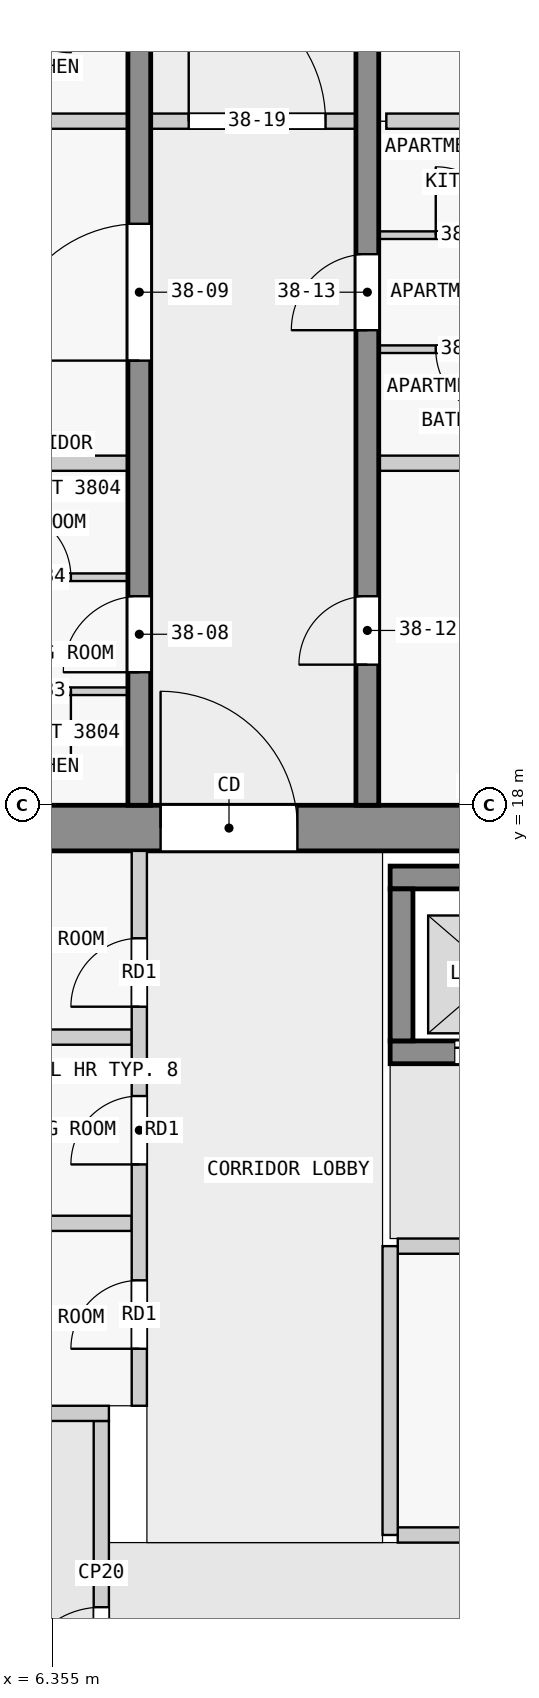
"""IFC4 building model, lengths in metres.
Left out: names, types, materials, properties, quantities, classifications, styles, units other than length and angle.
Written with IfcOpenShell. Run it as: python <this file> out.ifc"""

import sys

from ifc_helpers import new_model, si_unit, direction, frame, frame_2d, origin, place, context, subcontext, project, spatial, rectangle, extrude, element, fill, save


model = new_model("IFC4")
c1 = context("Model", 3, precision=1e-05, world=origin(), true_north=direction((0.0, 1.0)))
c2 = subcontext(c1, "Body", "Model", "MODEL_VIEW")
j1 = project(units=[si_unit("LENGTHUNIT", "METRE"), si_unit("PLANEANGLEUNIT", "RADIAN")], contexts=[c1])
p1 = place(None, origin())
s1 = spatial("IfcSite", under=j1, at=p1, CompositionType="ELEMENT")
p2 = place(p1, origin())
s2 = spatial("IfcBuilding", under=s1, at=p2, CompositionType="ELEMENT")
p3 = place(p2, frame((0.0, 0.0, 149.9)))
s3 = spatial("IfcBuildingStorey", under=s2, at=p3, CompositionType="ELEMENT", Elevation=149.9)
p4 = place(p3, frame((1.38, 17.7, 0.0), z_axis=(0.0, 0.0, 1.0), x_axis=(1.0, 0.0, 0.0)))
e1 = element("IfcWall", 1, at=p4, inside=s3, PredefinedType="SHEAR", context=c2, shape_type="SweptSolid", body=[
    extrude(rectangle(XDim=21.12, YDim=0.6, at=frame_2d((10.56, 0.0))), origin(), (0.0, 0.0, 1.0), 3.25),
])
p5 = place(p4, frame((6.4, 0.0, 0.0)))
e2 = element("IfcOpeningElement", 2, at=p5, cuts=e1, PredefinedType="OPENING", context=c2, shape_type="SweptSolid", body=[
    extrude(rectangle(XDim=1.8, YDim=2.1, at=frame_2d((0.9, 1.05))), frame((0.0, 0.31, 0.0), z_axis=(0.0, -1.0, 0.0), x_axis=(1.0, 0.0, 0.0)), (0.0, 0.0, 1.0), 0.62),
])
p6 = place(p3, frame((10.8, 17.05, 0.0), z_axis=(0.0, 0.0, 1.0), x_axis=(1.0, 0.0, 0.0)))
e3 = element("IfcWall", 3, at=p6, inside=s3, PredefinedType="SHEAR", context=c2, shape_type="SweptSolid", body=[
    extrude(rectangle(XDim=7.8, YDim=0.3, at=frame_2d((3.9, 0.0))), origin(), (0.0, 0.0, 1.0), 3.25),
])
p7 = place(p3, frame((10.8, 14.75, 0.0), z_axis=(0.0, 0.0, 1.0), x_axis=(1.0, 0.0, 0.0)))
e4 = element("IfcWall", 4, at=p7, inside=s3, PredefinedType="SHEAR", context=c2, shape_type="SweptSolid", body=[
    extrude(rectangle(XDim=7.8, YDim=0.3, at=frame_2d((3.9, 0.0))), origin(), (0.0, 0.0, 1.0), 3.25),
])
p8 = place(p7, frame((0.85, 0.0, 0.0)))
e5 = element("IfcOpeningElement", 5, at=p8, cuts=e4, PredefinedType="OPENING", context=c2, shape_type="SweptSolid", body=[
    extrude(rectangle(XDim=1.1, YDim=2.1, at=frame_2d((0.55, 1.05))), frame((0.0, 0.16, 0.0), z_axis=(0.0, -1.0, 0.0), x_axis=(1.0, 0.0, 0.0)), (0.0, 0.0, 1.0), 0.32),
])
p9 = place(p7, frame((3.35, 0.0, 0.0)))
e6 = element("IfcOpeningElement", 6, at=p9, cuts=e4, PredefinedType="OPENING", context=c2, shape_type="SweptSolid", body=[
    extrude(rectangle(XDim=1.1, YDim=2.1, at=frame_2d((0.55, 1.05))), frame((0.0, 0.16, 0.0), z_axis=(0.0, -1.0, 0.0), x_axis=(1.0, 0.0, 0.0)), (0.0, 0.0, 1.0), 0.32),
])
p10 = place(p7, frame((5.85, 0.0, 0.0)))
e7 = element("IfcOpeningElement", 7, at=p10, cuts=e4, PredefinedType="OPENING", context=c2, shape_type="SweptSolid", body=[
    extrude(rectangle(XDim=1.1, YDim=2.1, at=frame_2d((0.55, 1.05))), frame((0.0, 0.16, 0.0), z_axis=(0.0, -1.0, 0.0), x_axis=(1.0, 0.0, 0.0)), (0.0, 0.0, 1.0), 0.32),
])
p11 = place(p3, frame((10.95, 14.9, 0.0), z_axis=(0.0, 0.0, 1.0), x_axis=(0.0, 1.0, 0.0)))
e8 = element("IfcWall", 8, at=p11, inside=s3, PredefinedType="SHEAR", context=c2, shape_type="SweptSolid", body=[
    extrude(rectangle(XDim=2.0, YDim=0.3, at=frame_2d((1.0, 0.0))), origin(), (0.0, 0.0, 1.0), 3.25),
])
p12 = place(p3, frame((7.5, 18.0, 0.0), z_axis=(0.0, 0.0, 1.0), x_axis=(0.0, 1.0, 0.0)))
e9 = element("IfcWall", 9, at=p12, inside=s3, PredefinedType="SHEAR", context=c2, shape_type="SweptSolid", body=[
    extrude(rectangle(XDim=27.0, YDim=0.3, at=frame_2d((13.5, 0.0))), origin(), (0.0, 0.0, 1.0), 3.25),
])
p13 = place(p12, frame((1.75, 0.0, 0.0)))
e10 = element("IfcOpeningElement", 10, at=p13, cuts=e9, PredefinedType="OPENING", context=c2, shape_type="SweptSolid", body=[
    extrude(rectangle(XDim=1.0, YDim=2.1, at=frame_2d((0.5, 1.05))), frame((0.0, 0.16, 0.0), z_axis=(0.0, -1.0, 0.0), x_axis=(1.0, 0.0, 0.0)), (0.0, 0.0, 1.0), 0.32),
])
p14 = place(p12, frame((5.85, 0.0, 0.0)))
e11 = element("IfcOpeningElement", 11, at=p14, cuts=e9, PredefinedType="OPENING", context=c2, shape_type="SweptSolid", body=[
    extrude(rectangle(XDim=1.8, YDim=2.1, at=frame_2d((0.9, 1.05))), frame((0.0, 0.16, 0.0), z_axis=(0.0, -1.0, 0.0), x_axis=(1.0, 0.0, 0.0)), (0.0, 0.0, 1.0), 0.32),
])
p15 = place(p12, frame((13.05, 0.0, 0.0)))
e12 = element("IfcOpeningElement", 12, at=p15, cuts=e9, PredefinedType="OPENING", context=c2, shape_type="SweptSolid", body=[
    extrude(rectangle(XDim=1.0, YDim=2.1, at=frame_2d((0.5, 1.05))), frame((0.0, 0.16, 0.0), z_axis=(0.0, -1.0, 0.0), x_axis=(1.0, 0.0, 0.0)), (0.0, 0.0, 1.0), 0.32),
])
p16 = place(p12, frame((21.35, 0.0, 0.0)))
e13 = element("IfcOpeningElement", 13, at=p16, cuts=e9, PredefinedType="OPENING", context=c2, shape_type="SweptSolid", body=[
    extrude(rectangle(XDim=1.0, YDim=2.1, at=frame_2d((0.5, 1.05))), frame((0.0, 0.16, 0.0), z_axis=(0.0, -1.0, 0.0), x_axis=(1.0, 0.0, 0.0)), (0.0, 0.0, 1.0), 0.32),
])
p17 = place(p3, frame((10.5, 18.0, 0.0), z_axis=(0.0, 0.0, 1.0), x_axis=(0.0, 1.0, 0.0)))
e14 = element("IfcWall", 14, at=p17, inside=s3, PredefinedType="SHEAR", context=c2, shape_type="SweptSolid", body=[
    extrude(rectangle(XDim=27.0, YDim=0.3, at=frame_2d((13.5, 0.0))), origin(), (0.0, 0.0, 1.0), 3.25),
])
p18 = place(p17, frame((1.85, 0.0, 0.0)))
e15 = element("IfcOpeningElement", 15, at=p18, cuts=e14, PredefinedType="OPENING", context=c2, shape_type="SweptSolid", body=[
    extrude(rectangle(XDim=0.9, YDim=2.1, at=frame_2d((0.45, 1.05))), frame((0.0, 0.16, 0.0), z_axis=(0.0, -1.0, 0.0), x_axis=(1.0, 0.0, 0.0)), (0.0, 0.0, 1.0), 0.32),
])
p19 = place(p17, frame((6.25, 0.0, 0.0)))
e16 = element("IfcOpeningElement", 16, at=p19, cuts=e14, PredefinedType="OPENING", context=c2, shape_type="SweptSolid", body=[
    extrude(rectangle(XDim=1.0, YDim=2.1, at=frame_2d((0.5, 1.05))), frame((0.0, 0.16, 0.0), z_axis=(0.0, -1.0, 0.0), x_axis=(1.0, 0.0, 0.0)), (0.0, 0.0, 1.0), 0.32),
])
p20 = place(p17, frame((10.85, 0.0, 0.0)))
e17 = element("IfcOpeningElement", 17, at=p20, cuts=e14, PredefinedType="OPENING", context=c2, shape_type="SweptSolid", body=[
    extrude(rectangle(XDim=0.9, YDim=2.1, at=frame_2d((0.45, 1.05))), frame((0.0, 0.16, 0.0), z_axis=(0.0, -1.0, 0.0), x_axis=(1.0, 0.0, 0.0)), (0.0, 0.0, 1.0), 0.32),
])
p21 = place(p17, frame((17.55, 0.0, 0.0)))
e18 = element("IfcOpeningElement", 18, at=p21, cuts=e14, PredefinedType="OPENING", context=c2, shape_type="SweptSolid", body=[
    extrude(rectangle(XDim=1.0, YDim=2.1, at=frame_2d((0.5, 1.05))), frame((0.0, 0.16, 0.0), z_axis=(0.0, -1.0, 0.0), x_axis=(1.0, 0.0, 0.0)), (0.0, 0.0, 1.0), 0.32),
])
p22 = place(p17, frame((23.25, 0.0, 0.0)))
e19 = element("IfcOpeningElement", 19, at=p22, cuts=e14, PredefinedType="OPENING", context=c2, shape_type="SweptSolid", body=[
    extrude(rectangle(XDim=0.9, YDim=2.1, at=frame_2d((0.45, 1.05))), frame((0.0, 0.16, 0.0), z_axis=(0.0, -1.0, 0.0), x_axis=(1.0, 0.0, 0.0)), (0.0, 0.0, 1.0), 0.32),
])
p23 = place(p17, frame((25.45, 0.0, 0.0)))
e20 = element("IfcOpeningElement", 20, at=p23, cuts=e14, PredefinedType="OPENING", context=c2, shape_type="SweptSolid", body=[
    extrude(rectangle(XDim=1.0, YDim=2.1, at=frame_2d((0.5, 1.05))), frame((0.0, 0.16, 0.0), z_axis=(0.0, -1.0, 0.0), x_axis=(1.0, 0.0, 0.0)), (0.0, 0.0, 1.0), 0.32),
])
p24 = place(p3, frame((7.0, 5.9, 0.0), z_axis=(0.0, 0.0, 1.0), x_axis=(0.0, 1.0, 0.0)))
e21 = element("IfcWall", 21, at=p24, inside=s3, PredefinedType="PARTITIONING", context=c2, shape_type="SweptSolid", body=[
    extrude(rectangle(XDim=4.0, YDim=0.2, at=frame_2d((2.0, 0.0))), origin(), (0.0, 0.0, 1.0), 3.25),
])
p25 = place(p24, frame((0.45, 0.0, 0.0)))
e22 = element("IfcOpeningElement", 22, at=p25, cuts=e21, PredefinedType="OPENING", context=c2, shape_type="SweptSolid", body=[
    extrude(rectangle(XDim=1.1, YDim=2.1, at=frame_2d((0.55, 1.05))), frame((0.0, 0.11, 0.0), z_axis=(0.0, -1.0, 0.0), x_axis=(1.0, 0.0, 0.0)), (0.0, 0.0, 1.0), 0.22),
])
p26 = place(p3, frame((5.15, 10.0, 0.0), z_axis=(0.0, 0.0, 1.0), x_axis=(1.0, 0.0, 0.0)))
e23 = element("IfcWall", 23, at=p26, inside=s3, PredefinedType="PARTITIONING", context=c2, shape_type="SweptSolid", body=[
    extrude(rectangle(XDim=1.95, YDim=0.2, at=frame_2d((0.975, 0.0))), origin(), (0.0, 0.0, 1.0), 3.25),
])
p27 = place(p3, frame((10.8, 8.4, 0.0), z_axis=(0.0, 0.0, 1.0), x_axis=(0.0, 1.0, 0.0)))
e24 = element("IfcWall", 24, at=p27, inside=s3, PredefinedType="PARTITIONING", context=c2, shape_type="SweptSolid", body=[
    extrude(rectangle(XDim=3.8, YDim=0.2, at=frame_2d((1.9, 0.0))), origin(), (0.0, 0.0, 1.0), 3.25),
])
p28 = place(p3, frame((10.9, 8.4, 0.0), z_axis=(0.0, 0.0, 1.0), x_axis=(1.0, 0.0, 0.0)))
e25 = element("IfcWall", 25, at=p28, inside=s3, PredefinedType="PARTITIONING", context=c2, shape_type="SweptSolid", body=[
    extrude(rectangle(XDim=6.1, YDim=0.2, at=frame_2d((3.05, 0.0))), origin(), (0.0, 0.0, 1.0), 3.25),
])
p29 = place(p3, frame((10.9, 12.2, 0.0), z_axis=(0.0, 0.0, 1.0), x_axis=(1.0, 0.0, 0.0)))
e26 = element("IfcWall", 26, at=p29, inside=s3, PredefinedType="PARTITIONING", context=c2, shape_type="SweptSolid", body=[
    extrude(rectangle(XDim=6.1, YDim=0.2, at=frame_2d((3.05, 0.0))), origin(), (0.0, 0.0, 1.0), 3.25),
])
p30 = place(p29, frame((2.6, 0.0, 0.0)))
e27 = element("IfcOpeningElement", 27, at=p30, cuts=e26, PredefinedType="OPENING", context=c2, shape_type="SweptSolid", body=[
    extrude(rectangle(XDim=0.9, YDim=2.1, at=frame_2d((0.45, 1.05))), frame((0.0, 0.11, 0.0), z_axis=(0.0, -1.0, 0.0), x_axis=(1.0, 0.0, 0.0)), (0.0, 0.0, 1.0), 0.22),
])
p31 = place(p3, frame((7.5, 10.1, 0.0), z_axis=(0.0, 0.0, 1.0), x_axis=(0.0, 1.0, 0.0)))
e28 = element("IfcWall", 28, at=p31, inside=s3, PredefinedType="PARTITIONING", context=c2, shape_type="SweptSolid", body=[
    extrude(rectangle(XDim=7.3, YDim=0.2, at=frame_2d((3.65, 0.0))), origin(), (0.0, 0.0, 1.0), 3.25),
])
p32 = place(p31, frame((0.75, 0.0, 0.0)))
e29 = element("IfcOpeningElement", 29, at=p32, cuts=e28, PredefinedType="OPENING", context=c2, shape_type="SweptSolid", body=[
    extrude(rectangle(XDim=0.9, YDim=2.1, at=frame_2d((0.45, 1.05))), frame((0.0, 0.11, 0.0), z_axis=(0.0, -1.0, 0.0), x_axis=(1.0, 0.0, 0.0)), (0.0, 0.0, 1.0), 0.22),
])
p33 = place(p31, frame((3.175, 0.0, 0.0)))
e30 = element("IfcOpeningElement", 30, at=p33, cuts=e28, PredefinedType="OPENING", context=c2, shape_type="SweptSolid", body=[
    extrude(rectangle(XDim=0.9, YDim=2.1, at=frame_2d((0.45, 1.05))), frame((0.0, 0.11, 0.0), z_axis=(0.0, -1.0, 0.0), x_axis=(1.0, 0.0, 0.0)), (0.0, 0.0, 1.0), 0.22),
])
p34 = place(p31, frame((5.25, 0.0, 0.0)))
e31 = element("IfcOpeningElement", 31, at=p34, cuts=e28, PredefinedType="OPENING", context=c2, shape_type="SweptSolid", body=[
    extrude(rectangle(XDim=0.9, YDim=2.1, at=frame_2d((0.45, 1.05))), frame((0.0, 0.11, 0.0), z_axis=(0.0, -1.0, 0.0), x_axis=(1.0, 0.0, 0.0)), (0.0, 0.0, 1.0), 0.22),
])
for number, where, z_axis, x_axis in (
    (32, (5.15, 12.5, 0.0), (0.0, 0.0, 1.0), (1.0, 0.0, 0.0)),
    (33, (5.15, 14.95, 0.0), (0.0, 0.0, 1.0), (1.0, 0.0, 0.0)),
):
    element("IfcWall", number, at=place(p3, frame(where, z_axis=z_axis, x_axis=x_axis)), inside=s3, PredefinedType="PARTITIONING", context=c2, shape_type="SweptSolid", body=[
        extrude(rectangle(XDim=2.25, YDim=0.2, at=frame_2d((1.125, 0.0))), origin(), (0.0, 0.0, 1.0), 3.25),
    ])
p35 = place(p3, frame((7.35, 19.5, 0.0), z_axis=(0.0, 0.0, 1.0), x_axis=(-1.0, 0.0, 0.0)))
e34 = element("IfcWall", 34, at=p35, inside=s3, PredefinedType="PARTITIONING", context=c2, shape_type="SweptSolid", body=[
    extrude(rectangle(XDim=2.4, YDim=0.1, at=frame_2d((1.2, 0.0))), origin(), (0.0, 0.0, 1.0), 3.25),
])
p36 = place(p35, frame((0.75, 0.0, 0.0)))
e35 = element("IfcOpeningElement", 35, at=p36, cuts=e34, PredefinedType="OPENING", context=c2, shape_type="SweptSolid", body=[
    extrude(rectangle(XDim=0.9, YDim=2.1, at=frame_2d((0.45, 1.05))), frame((0.0, 0.06, 0.0), z_axis=(0.0, -1.0, 0.0), x_axis=(1.0, 0.0, 0.0)), (0.0, 0.0, 1.0), 0.12),
])
p37 = place(p3, frame((4.95, 21.0, 0.0), z_axis=(0.0, 0.0, 1.0), x_axis=(1.0, 0.0, 0.0)))
e36 = element("IfcWall", 36, at=p37, inside=s3, PredefinedType="PARTITIONING", context=c2, shape_type="SweptSolid", body=[
    extrude(rectangle(XDim=2.4, YDim=0.1, at=frame_2d((1.2, 0.0))), origin(), (0.0, 0.0, 1.0), 3.25),
])
p38 = place(p37, frame((0.75, 0.0, 0.0)))
e37 = element("IfcOpeningElement", 37, at=p38, cuts=e36, PredefinedType="OPENING", context=c2, shape_type="SweptSolid", body=[
    extrude(rectangle(XDim=0.9, YDim=2.1, at=frame_2d((0.45, 1.05))), frame((0.0, 0.06, 0.0), z_axis=(0.0, -1.0, 0.0), x_axis=(1.0, 0.0, 0.0)), (0.0, 0.0, 1.0), 0.12),
])
p39 = place(p3, frame((7.35, 22.5, 0.0), z_axis=(0.0, 0.0, 1.0), x_axis=(-1.0, 0.0, 0.0)))
e38 = element("IfcWall", 38, at=p39, inside=s3, PredefinedType="PARTITIONING", context=c2, shape_type="SweptSolid", body=[
    extrude(rectangle(XDim=2.3, YDim=0.2, at=frame_2d((1.15, 0.0))), origin(), (0.0, 0.0, 1.0), 3.25),
])
p40 = place(p3, frame((17.85, 22.5, 0.0), z_axis=(0.0, 0.0, 1.0), x_axis=(-1.0, 0.0, 0.0)))
e39 = element("IfcWall", 39, at=p40, inside=s3, PredefinedType="PARTITIONING", context=c2, shape_type="SweptSolid", body=[
    extrude(rectangle(XDim=7.2, YDim=0.2, at=frame_2d((3.6, 0.0))), origin(), (0.0, 0.0, 1.0), 3.25),
])
p41 = place(p3, frame((13.05, 24.0, 0.0), z_axis=(0.0, 0.0, 1.0), x_axis=(-1.0, 0.0, 0.0)))
e40 = element("IfcWall", 40, at=p41, inside=s3, PredefinedType="PARTITIONING", context=c2, shape_type="SweptSolid", body=[
    extrude(rectangle(XDim=2.4, YDim=0.1, at=frame_2d((1.2, 0.0))), origin(), (0.0, 0.0, 1.0), 3.25),
])
p42 = place(p41, frame((0.75, 0.0, 0.0)))
e41 = element("IfcOpeningElement", 41, at=p42, cuts=e40, PredefinedType="OPENING", context=c2, shape_type="SweptSolid", body=[
    extrude(rectangle(XDim=0.9, YDim=2.1, at=frame_2d((0.45, 1.05))), frame((0.0, 0.06, 0.0), z_axis=(0.0, -1.0, 0.0), x_axis=(1.0, 0.0, 0.0)), (0.0, 0.0, 1.0), 0.12),
])
p43 = place(p3, frame((10.65, 25.5, 0.0), z_axis=(0.0, 0.0, 1.0), x_axis=(1.0, 0.0, 0.0)))
e42 = element("IfcWall", 42, at=p43, inside=s3, PredefinedType="PARTITIONING", context=c2, shape_type="SweptSolid", body=[
    extrude(rectangle(XDim=2.4, YDim=0.1, at=frame_2d((1.2, 0.0))), origin(), (0.0, 0.0, 1.0), 3.25),
])
p44 = place(p43, frame((0.75, 0.0, 0.0)))
e43 = element("IfcOpeningElement", 43, at=p44, cuts=e42, PredefinedType="OPENING", context=c2, shape_type="SweptSolid", body=[
    extrude(rectangle(XDim=0.9, YDim=2.1, at=frame_2d((0.45, 1.05))), frame((0.0, 0.06, 0.0), z_axis=(0.0, -1.0, 0.0), x_axis=(1.0, 0.0, 0.0)), (0.0, 0.0, 1.0), 0.12),
])
p45 = place(p3, frame((7.35, 27.0, 0.0), z_axis=(0.0, 0.0, 1.0), x_axis=(-1.0, 0.0, 0.0)))
e44 = element("IfcWall", 44, at=p45, inside=s3, PredefinedType="PARTITIONING", context=c2, shape_type="SweptSolid", body=[
    extrude(rectangle(XDim=7.43, YDim=0.2, at=frame_2d((3.715, 0.0))), origin(), (0.0, 0.0, 1.0), 3.25),
])
p46 = place(p3, frame((12.95, 27.0, 0.0), z_axis=(0.0, 0.0, 1.0), x_axis=(-1.0, 0.0, 0.0)))
e45 = element("IfcWall", 45, at=p46, inside=s3, PredefinedType="PARTITIONING", context=c2, shape_type="SweptSolid", body=[
    extrude(rectangle(XDim=2.2, YDim=0.2, at=frame_2d((1.1, 0.0))), origin(), (0.0, 0.0, 1.0), 3.25),
])
p47 = place(p3, frame((7.45, 27.0, 0.0), z_axis=(0.0, 0.0, 1.0), x_axis=(1.0, 0.0, 0.0)))
e46 = element("IfcWall", 46, at=p47, inside=s3, PredefinedType="PARTITIONING", context=c2, shape_type="SweptSolid", body=[
    extrude(rectangle(XDim=3.2, YDim=0.2, at=frame_2d((1.6, 0.0))), origin(), (0.0, 0.0, 1.0), 3.25),
])
p48 = place(p47, frame((0.7, 0.0, 0.0)))
e47 = element("IfcOpeningElement", 47, at=p48, cuts=e46, PredefinedType="OPENING", context=c2, shape_type="SweptSolid", body=[
    extrude(rectangle(XDim=1.8, YDim=2.1, at=frame_2d((0.9, 1.05))), frame((0.0, 0.11, 0.0), z_axis=(0.0, -1.0, 0.0), x_axis=(1.0, 0.0, 0.0)), (0.0, 0.0, 1.0), 0.22),
])
p49 = place(p25, origin())
e48 = element("IfcDoor", 48, at=p49, inside=s3, OperationType="SINGLE_SWING_LEFT", PredefinedType="DOOR", context=c2, shape_type="SweptSolid", body=[
    extrude(rectangle(XDim=1.1, YDim=2.1, at=frame_2d((0.55, 1.05))), frame((0.0, 0.025, 0.0), z_axis=(0.0, -1.0, 0.0), x_axis=(1.0, 0.0, 0.0)), (0.0, 0.0, 1.0), 0.05),
])
fill(e22, e48)
p50 = place(p8, origin())
e49 = element("IfcDoor", 49, at=p50, inside=s3, OperationType="DOUBLE_DOOR_SLIDING", PredefinedType="DOOR", context=c2, shape_type="SweptSolid", body=[
    extrude(rectangle(XDim=1.1, YDim=2.1, at=frame_2d((0.55, 1.05))), frame((0.0, 0.025, 0.0), z_axis=(0.0, -1.0, 0.0), x_axis=(1.0, 0.0, 0.0)), (0.0, 0.0, 1.0), 0.05),
])
fill(e5, e49)
p51 = place(p5, origin())
e50 = element("IfcDoor", 50, at=p51, inside=s3, OperationType="DOUBLE_DOOR_SINGLE_SWING", PredefinedType="DOOR", context=c2, shape_type="SweptSolid", body=[
    extrude(rectangle(XDim=1.8, YDim=2.1, at=frame_2d((0.9, 1.05))), frame((0.0, 0.025, 0.0), z_axis=(0.0, -1.0, 0.0), x_axis=(1.0, 0.0, 0.0)), (0.0, 0.0, 1.0), 0.05),
])
fill(e2, e50)
p52 = place(p32, origin())
e51 = element("IfcDoor", 51, at=p52, inside=s3, OperationType="SINGLE_SWING_RIGHT", PredefinedType="DOOR", context=c2, shape_type="SweptSolid", body=[
    extrude(rectangle(XDim=0.9, YDim=2.1, at=frame_2d((0.45, 1.05))), frame((0.0, 0.025, 0.0), z_axis=(0.0, -1.0, 0.0), x_axis=(1.0, 0.0, 0.0)), (0.0, 0.0, 1.0), 0.05),
])
fill(e29, e51)
p53 = place(p33, origin())
e52 = element("IfcDoor", 52, at=p53, inside=s3, OperationType="SINGLE_SWING_RIGHT", PredefinedType="DOOR", context=c2, shape_type="SweptSolid", body=[
    extrude(rectangle(XDim=0.9, YDim=2.1, at=frame_2d((0.45, 1.05))), frame((0.0, 0.025, 0.0), z_axis=(0.0, -1.0, 0.0), x_axis=(1.0, 0.0, 0.0)), (0.0, 0.0, 1.0), 0.05),
])
fill(e30, e52)
p54 = place(p34, origin())
e53 = element("IfcDoor", 53, at=p54, inside=s3, OperationType="SINGLE_SWING_RIGHT", PredefinedType="DOOR", context=c2, shape_type="SweptSolid", body=[
    extrude(rectangle(XDim=0.9, YDim=2.1, at=frame_2d((0.45, 1.05))), frame((0.0, 0.025, 0.0), z_axis=(0.0, -1.0, 0.0), x_axis=(1.0, 0.0, 0.0)), (0.0, 0.0, 1.0), 0.05),
])
fill(e31, e53)
p55 = place(p13, origin())
e54 = element("IfcDoor", 54, at=p55, inside=s3, OperationType="SINGLE_SWING_LEFT", PredefinedType="DOOR", context=c2, shape_type="SweptSolid", body=[
    extrude(rectangle(XDim=1.0, YDim=2.1, at=frame_2d((0.5, 1.05))), frame((0.0, 0.025, 0.0), z_axis=(0.0, -1.0, 0.0), x_axis=(1.0, 0.0, 0.0)), (0.0, 0.0, 1.0), 0.05),
])
fill(e10, e54)
p56 = place(p14, origin())
e55 = element("IfcDoor", 55, at=p56, inside=s3, OperationType="SINGLE_SWING_LEFT", PredefinedType="DOOR", context=c2, shape_type="SweptSolid", body=[
    extrude(rectangle(XDim=1.8, YDim=2.1, at=frame_2d((0.9, 1.05))), frame((0.0, 0.025, 0.0), z_axis=(0.0, -1.0, 0.0), x_axis=(1.0, 0.0, 0.0)), (0.0, 0.0, 1.0), 0.05),
])
fill(e11, e55)
p57 = place(p18, origin())
e56 = element("IfcDoor", 56, at=p57, inside=s3, OperationType="SINGLE_SWING_LEFT", PredefinedType="DOOR", context=c2, shape_type="SweptSolid", body=[
    extrude(rectangle(XDim=0.9, YDim=2.1, at=frame_2d((0.45, 1.05))), frame((0.0, 0.025, 0.0), z_axis=(0.0, -1.0, 0.0), x_axis=(1.0, 0.0, 0.0)), (0.0, 0.0, 1.0), 0.05),
])
fill(e15, e56)
p58 = place(p19, origin())
e57 = element("IfcDoor", 57, at=p58, inside=s3, OperationType="SINGLE_SWING_LEFT", PredefinedType="DOOR", context=c2, shape_type="SweptSolid", body=[
    extrude(rectangle(XDim=1.0, YDim=2.1, at=frame_2d((0.5, 1.05))), frame((0.0, 0.025, 0.0), z_axis=(0.0, -1.0, 0.0), x_axis=(1.0, 0.0, 0.0)), (0.0, 0.0, 1.0), 0.05),
])
fill(e16, e57)
p59 = place(p48, origin())
e58 = element("IfcDoor", 58, at=p59, inside=s3, OperationType="SINGLE_SWING_LEFT", PredefinedType="DOOR", context=c2, shape_type="SweptSolid", body=[
    extrude(rectangle(XDim=1.8, YDim=2.1, at=frame_2d((0.9, 1.05))), frame((0.0, 0.025, 0.0), z_axis=(0.0, -1.0, 0.0), x_axis=(1.0, 0.0, 0.0)), (0.0, 0.0, 1.0), 0.05),
])
fill(e47, e58)
p60 = place(p36, origin())
e59 = element("IfcDoor", 59, at=p60, inside=s3, OperationType="SINGLE_SWING_RIGHT", PredefinedType="DOOR", context=c2, shape_type="SweptSolid", body=[
    extrude(rectangle(XDim=0.9, YDim=2.1, at=frame_2d((0.45, 1.05))), frame((0.0, 0.025, 0.0), z_axis=(0.0, -1.0, 0.0), x_axis=(1.0, 0.0, 0.0)), (0.0, 0.0, 1.0), 0.05),
])
fill(e35, e59)
p61 = place(p38, origin())
e60 = element("IfcDoor", 60, at=p61, inside=s3, OperationType="SINGLE_SWING_RIGHT", PredefinedType="DOOR", context=c2, shape_type="SweptSolid", body=[
    extrude(rectangle(XDim=0.9, YDim=2.1, at=frame_2d((0.45, 1.05))), frame((0.0, 0.025, 0.0), z_axis=(0.0, -1.0, 0.0), x_axis=(1.0, 0.0, 0.0)), (0.0, 0.0, 1.0), 0.05),
])
fill(e37, e60)
p62 = place(p42, origin())
e61 = element("IfcDoor", 61, at=p62, inside=s3, OperationType="SINGLE_SWING_LEFT", PredefinedType="DOOR", context=c2, shape_type="SweptSolid", body=[
    extrude(rectangle(XDim=0.9, YDim=2.1, at=frame_2d((0.45, 1.05))), frame((0.0, 0.025, 0.0), z_axis=(0.0, -1.0, 0.0), x_axis=(1.0, 0.0, 0.0)), (0.0, 0.0, 1.0), 0.05),
])
fill(e41, e61)
p63 = place(p44, origin())
e62 = element("IfcDoor", 62, at=p63, inside=s3, OperationType="SINGLE_SWING_LEFT", PredefinedType="DOOR", context=c2, shape_type="SweptSolid", body=[
    extrude(rectangle(XDim=0.9, YDim=2.1, at=frame_2d((0.45, 1.05))), frame((0.0, 0.025, 0.0), z_axis=(0.0, -1.0, 0.0), x_axis=(1.0, 0.0, 0.0)), (0.0, 0.0, 1.0), 0.05),
])
fill(e43, e62)
save(model, sys.argv[1])
